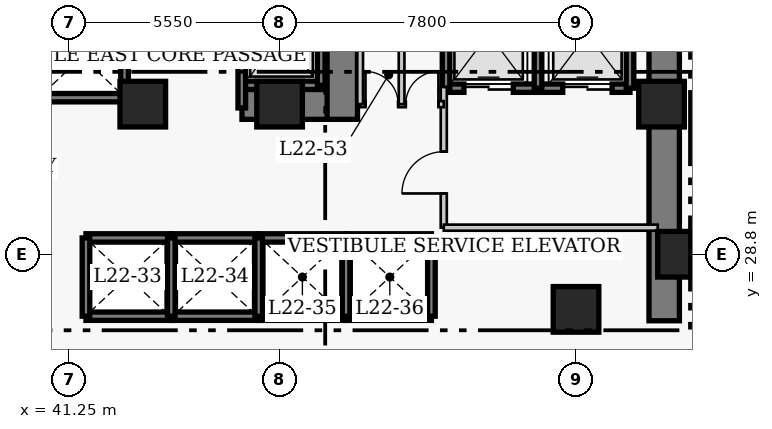
"""IFC4 building model, lengths in metres.
Left out: names, types, materials, properties, quantities, classifications, styles, units other than length and angle.
Written with IfcOpenShell. Run it as: python <this file> out.ifc"""

import sys

from ifc_helpers import new_model, si_unit, direction, frame, frame_2d, origin, origin_2d, place, context, subcontext, project, spatial, rectangle, extrude, element, fill, save


model = new_model("IFC4")
c1 = context("Model", 3, precision=1e-05, world=origin(), true_north=direction((0.0, 1.0)))
c2 = subcontext(c1, "Body", "Model", "MODEL_VIEW")
j1 = project(units=[si_unit("LENGTHUNIT", "METRE"), si_unit("PLANEANGLEUNIT", "RADIAN")], contexts=[c1])
p1 = place(None, origin())
s1 = spatial("IfcSite", under=j1, at=p1, CompositionType="ELEMENT")
p2 = place(p1, origin())
s2 = spatial("IfcBuilding", under=s1, at=p2, CompositionType="ELEMENT")
p3 = place(p2, frame((0.0, 0.0, 91.8)))
s3 = spatial("IfcBuildingStorey", under=s2, at=p3, CompositionType="ELEMENT", Elevation=91.8)
p4 = place(p3, frame((56.92, 27.05, 0.0), z_axis=(0.0, 0.0, 1.0), x_axis=(0.0, 1.0, 0.0)))
e1 = element("IfcWall", 1, at=p4, inside=s3, PredefinedType="SHEAR", context=c2, shape_type="SweptSolid", body=[
    extrude(rectangle(XDim=13.67, YDim=0.8, at=frame_2d((6.835, 0.0))), origin(), (0.0, 0.0, 1.0), 3.8),
])
p5 = place(p3, frame((45.81, 32.75, 0.0), z_axis=(0.0, 0.0, 1.0), x_axis=(1.0, 0.0, 0.0)))
e2 = element("IfcWall", 2, at=p5, inside=s3, PredefinedType="SHEAR", context=c2, shape_type="SweptSolid", body=[
    extrude(rectangle(XDim=2.64, YDim=0.8, at=frame_2d((1.32, 0.0))), origin(), (0.0, 0.0, 1.0), 3.8),
])
p6 = place(p3, frame((48.45, 32.35, 0.0), z_axis=(0.0, 0.0, 1.0), x_axis=(0.0, 1.0, 0.0)))
e3 = element("IfcWall", 3, at=p6, inside=s3, PredefinedType="SHEAR", context=c2, shape_type="SweptSolid", body=[
    extrude(rectangle(XDim=7.97, YDim=0.8, at=frame_2d((3.985, 0.0))), origin(), (0.0, 0.0, 1.0), 3.8),
])
p7 = place(p6, frame((5.85, 0.0, 0.0)))
e4 = element("IfcOpeningElement", 4, at=p7, cuts=e3, PredefinedType="OPENING", context=c2, shape_type="SweptSolid", body=[
    extrude(rectangle(XDim=1.1, YDim=2.15, at=frame_2d((0.55, 1.075))), frame((0.0, 0.41, 0.0), z_axis=(0.0, -1.0, 0.0), x_axis=(1.0, 0.0, 0.0)), (0.0, 0.0, 1.0), 0.82),
])
for number, where, z_axis, x_axis in (
    (5, (57.35, 28.8, 0.0), (0.0, 0.0, 1.0), (1.0, 0.0, 0.0)),
    (6, (43.2, 32.75, 0.0), (0.0, 0.0, 1.0), (1.0, 0.0, 0.0)),
    (7, (46.8, 32.75, 0.0), (0.0, 0.0, 1.0), (1.0, 0.0, 0.0)),
    (8, (54.6, 27.35, 0.0), (0.0, 0.0, 1.0), (1.0, 0.0, 0.0)),
    (9, (56.85, 32.75, 0.0), (0.0, 0.0, 1.0), (1.0, 0.0, 0.0)),
):
    element("IfcColumn", number, at=place(p3, frame(where, z_axis=z_axis, x_axis=x_axis)), inside=s3, PredefinedType="COLUMN", context=c2, shape_type="SweptSolid", body=[
        extrude(rectangle(XDim=1.2, YDim=1.2, at=origin_2d()), origin(), (0.0, 0.0, 1.0), 3.8),
    ])
for number, where, z_axis, x_axis in (
    (10, (41.705, 29.23, 0.0), (0.0, 0.0, 1.0), (1.0, 0.0, 0.0)),
    (11, (41.705, 27.17, 0.0), (0.0, 0.0, 1.0), (1.0, 0.0, 0.0)),
):
    element("IfcWall", number, at=place(p3, frame(where, z_axis=z_axis, x_axis=x_axis)), inside=s3, PredefinedType="SHEAR", context=c2, shape_type="SweptSolid", body=[
        extrude(rectangle(XDim=2.245, YDim=0.22, at=frame_2d((1.123, 0.0))), origin(), (0.0, 0.0, 1.0), 3.8),
    ])
p8 = place(p3, frame((41.705, 27.17, 0.0), z_axis=(0.0, 0.0, 1.0), x_axis=(0.0, 1.0, 0.0)))
e12 = element("IfcWall", 12, at=p8, inside=s3, PredefinedType="SHEAR", context=c2, shape_type="SweptSolid", body=[
    extrude(rectangle(XDim=2.06, YDim=0.2, at=frame_2d((1.03, 0.0))), origin(), (0.0, 0.0, 1.0), 3.8),
])
for number, where, z_axis, x_axis in (
    (13, (43.95, 29.23, 0.0), (0.0, 0.0, 1.0), (1.0, 0.0, 0.0)),
    (14, (43.95, 27.17, 0.0), (0.0, 0.0, 1.0), (1.0, 0.0, 0.0)),
):
    element("IfcWall", number, at=place(p3, frame(where, z_axis=z_axis, x_axis=x_axis)), inside=s3, PredefinedType="SHEAR", context=c2, shape_type="SweptSolid", body=[
        extrude(rectangle(XDim=2.3, YDim=0.22, at=frame_2d((1.15, 0.0))), origin(), (0.0, 0.0, 1.0), 3.8),
    ])
p9 = place(p3, frame((43.95, 27.17, 0.0), z_axis=(0.0, 0.0, 1.0), x_axis=(0.0, 1.0, 0.0)))
e15 = element("IfcWall", 15, at=p9, inside=s3, PredefinedType="SHEAR", context=c2, shape_type="SweptSolid", body=[
    extrude(rectangle(XDim=2.06, YDim=0.2, at=frame_2d((1.03, 0.0))), origin(), (0.0, 0.0, 1.0), 3.8),
])
for number, where, z_axis, x_axis in (
    (16, (46.25, 29.23, 0.0), (0.0, 0.0, 1.0), (1.0, 0.0, 0.0)),
    (17, (46.25, 27.17, 0.0), (0.0, 0.0, 1.0), (1.0, 0.0, 0.0)),
):
    element("IfcWall", number, at=place(p3, frame(where, z_axis=z_axis, x_axis=x_axis)), inside=s3, PredefinedType="SHEAR", context=c2, shape_type="SweptSolid", body=[
        extrude(rectangle(XDim=2.3, YDim=0.22, at=frame_2d((1.15, 0.0))), origin(), (0.0, 0.0, 1.0), 3.8),
    ])
p10 = place(p3, frame((46.25, 27.17, 0.0), z_axis=(0.0, 0.0, 1.0), x_axis=(0.0, 1.0, 0.0)))
e18 = element("IfcWall", 18, at=p10, inside=s3, PredefinedType="SHEAR", context=c2, shape_type="SweptSolid", body=[
    extrude(rectangle(XDim=2.06, YDim=0.2, at=frame_2d((1.03, 0.0))), origin(), (0.0, 0.0, 1.0), 3.8),
])
for number, where, z_axis, x_axis in (
    (19, (48.55, 29.23, 0.0), (0.0, 0.0, 1.0), (1.0, 0.0, 0.0)),
    (20, (48.55, 27.17, 0.0), (0.0, 0.0, 1.0), (1.0, 0.0, 0.0)),
):
    element("IfcWall", number, at=place(p3, frame(where, z_axis=z_axis, x_axis=x_axis)), inside=s3, PredefinedType="SHEAR", context=c2, shape_type="SweptSolid", body=[
        extrude(rectangle(XDim=2.245, YDim=0.22, at=frame_2d((1.123, 0.0))), origin(), (0.0, 0.0, 1.0), 3.8),
    ])
for number, where, z_axis, x_axis in (
    (21, (48.55, 27.17, 0.0), (0.0, 0.0, 1.0), (0.0, 1.0, 0.0)),
    (22, (50.795, 27.17, 0.0), (0.0, 0.0, 1.0), (0.0, 1.0, 0.0)),
):
    element("IfcWall", number, at=place(p3, frame(where, z_axis=z_axis, x_axis=x_axis)), inside=s3, PredefinedType="SHEAR", context=c2, shape_type="SweptSolid", body=[
        extrude(rectangle(XDim=2.06, YDim=0.2, at=frame_2d((1.03, 0.0))), origin(), (0.0, 0.0, 1.0), 3.8),
    ])
p11 = place(p3, frame((40.4, 32.92, 0.0), z_axis=(0.0, 0.0, 1.0), x_axis=(1.0, 0.0, 0.0)))
e23 = element("IfcWall", 23, at=p11, inside=s3, PredefinedType="SHEAR", context=c2, shape_type="SweptSolid", body=[
    extrude(rectangle(XDim=2.32, YDim=0.22, at=frame_2d((1.16, 0.0))), origin(), (0.0, 0.0, 1.0), 3.8),
])
p12 = place(p3, frame((42.72, 32.92, 0.0), z_axis=(0.0, 0.0, 1.0), x_axis=(0.0, 1.0, 0.0)))
e24 = element("IfcWall", 24, at=p12, inside=s3, PredefinedType="SHEAR", context=c2, shape_type="SweptSolid", body=[
    extrude(rectangle(XDim=2.16, YDim=0.2, at=frame_2d((1.08, 0.0))), origin(), (0.0, 0.0, 1.0), 3.8),
])
p13 = place(p3, frame((51.18, 33.17, 0.0), z_axis=(0.0, 0.0, 1.0), x_axis=(1.0, 0.0, 0.0)))
e25 = element("IfcWall", 25, at=p13, inside=s3, PredefinedType="SHEAR", context=c2, shape_type="SweptSolid", body=[
    extrude(rectangle(XDim=2.42, YDim=0.22, at=frame_2d((1.21, 0.0))), origin(), (0.0, 0.0, 1.0), 3.8),
])
p14 = place(p13, frame((0.47, 0.0, 0.0)))
e26 = element("IfcOpeningElement", 26, at=p14, cuts=e25, PredefinedType="OPENING", context=c2, shape_type="SweptSolid", body=[
    extrude(rectangle(XDim=1.3, YDim=2.15, at=frame_2d((0.65, 1.075))), frame((0.0, 0.12, 0.0), z_axis=(0.0, -1.0, 0.0), x_axis=(1.0, 0.0, 0.0)), (0.0, 0.0, 1.0), 0.24),
])
p15 = place(p3, frame((51.18, 33.17, 0.0), z_axis=(0.0, 0.0, 1.0), x_axis=(0.0, 1.0, 0.0)))
e27 = element("IfcWall", 27, at=p15, inside=s3, PredefinedType="SHEAR", context=c2, shape_type="SweptSolid", body=[
    extrude(rectangle(XDim=2.86, YDim=0.2, at=frame_2d((1.43, 0.0))), origin(), (0.0, 0.0, 1.0), 3.8),
])
p16 = place(p3, frame((53.6, 33.17, 0.0), z_axis=(0.0, 0.0, 1.0), x_axis=(1.0, 0.0, 0.0)))
e28 = element("IfcWall", 28, at=p16, inside=s3, PredefinedType="SHEAR", context=c2, shape_type="SweptSolid", body=[
    extrude(rectangle(XDim=2.42, YDim=0.22, at=frame_2d((1.21, 0.0))), origin(), (0.0, 0.0, 1.0), 3.8),
])
p17 = place(p16, frame((0.65, 0.0, 0.0)))
e29 = element("IfcOpeningElement", 29, at=p17, cuts=e28, PredefinedType="OPENING", context=c2, shape_type="SweptSolid", body=[
    extrude(rectangle(XDim=1.3, YDim=2.15, at=frame_2d((0.65, 1.075))), frame((0.0, 0.12, 0.0), z_axis=(0.0, -1.0, 0.0), x_axis=(1.0, 0.0, 0.0)), (0.0, 0.0, 1.0), 0.24),
])
for number, where, z_axis, x_axis in (
    (30, (53.6, 33.17, 0.0), (0.0, 0.0, 1.0), (0.0, 1.0, 0.0)),
    (31, (56.02, 33.17, 0.0), (0.0, 0.0, 1.0), (0.0, 1.0, 0.0)),
):
    element("IfcWall", number, at=place(p3, frame(where, z_axis=z_axis, x_axis=x_axis)), inside=s3, PredefinedType="SHEAR", context=c2, shape_type="SweptSolid", body=[
        extrude(rectangle(XDim=2.86, YDim=0.2, at=frame_2d((1.43, 0.0))), origin(), (0.0, 0.0, 1.0), 3.8),
    ])
p18 = place(p3, frame((45.805, 33.245, 0.0), z_axis=(0.0, 0.0, 1.0), x_axis=(1.0, 0.0, 0.0)))
e32 = element("IfcWall", 32, at=p18, inside=s3, PredefinedType="SHEAR", context=c2, shape_type="SweptSolid", body=[
    extrude(rectangle(XDim=2.09, YDim=0.22, at=frame_2d((1.045, 0.0))), origin(), (0.0, 0.0, 1.0), 3.8),
])
p19 = place(p3, frame((45.805, 32.65, 0.0), z_axis=(0.0, 0.0, 1.0), x_axis=(0.0, 1.0, 0.0)))
e33 = element("IfcWall", 33, at=p19, inside=s3, PredefinedType="SHEAR", context=c2, shape_type="SweptSolid", body=[
    extrude(rectangle(XDim=3.505, YDim=0.2, at=frame_2d((1.752, 0.0))), origin(), (0.0, 0.0, 1.0), 3.8),
])
p20 = place(p3, frame((47.895, 33.245, 0.0), z_axis=(0.0, 0.0, 1.0), x_axis=(0.0, 1.0, 0.0)))
e34 = element("IfcWall", 34, at=p20, inside=s3, PredefinedType="SHEAR", context=c2, shape_type="SweptSolid", body=[
    extrude(rectangle(XDim=2.91, YDim=0.2, at=frame_2d((1.455, 0.0))), origin(), (0.0, 0.0, 1.0), 3.8),
])
p21 = place(p3, frame((51.12, 29.5, 0.0), z_axis=(0.0, 0.0, 1.0), x_axis=(0.0, 1.0, 0.0)))
e35 = element("IfcWall", 35, at=p21, inside=s3, PredefinedType="PARTITIONING", context=c2, shape_type="SweptSolid", body=[
    extrude(rectangle(XDim=3.7, YDim=0.16, at=frame_2d((1.85, 0.0))), origin(), (0.0, 0.0, 1.0), 3.54),
])
p22 = place(p21, frame((0.9, 0.0, 0.0)))
e36 = element("IfcOpeningElement", 36, at=p22, cuts=e35, PredefinedType="OPENING", context=c2, shape_type="SweptSolid", body=[
    extrude(rectangle(XDim=1.1, YDim=2.15, at=frame_2d((0.55, 1.075))), frame((0.0, 0.09, 0.0), z_axis=(0.0, -1.0, 0.0), x_axis=(1.0, 0.0, 0.0)), (0.0, 0.0, 1.0), 0.18),
])
p23 = place(p3, frame((51.12, 29.5, 0.0), z_axis=(0.0, 0.0, 1.0), x_axis=(1.0, 0.0, 0.0)))
e37 = element("IfcWall", 37, at=p23, inside=s3, PredefinedType="PARTITIONING", context=c2, shape_type="SweptSolid", body=[
    extrude(rectangle(XDim=5.63, YDim=0.16, at=frame_2d((2.815, 0.0))), origin(), (0.0, 0.0, 1.0), 3.54),
])
p24 = place(p3, frame((48.92, 32.75, 0.0), z_axis=(0.0, 0.0, 1.0), x_axis=(1.0, 0.0, 0.0)))
e38 = element("IfcWall", 38, at=p24, inside=s3, PredefinedType="PARTITIONING", context=c2, shape_type="SweptSolid", body=[
    extrude(rectangle(XDim=2.2, YDim=0.16, at=frame_2d((1.1, 0.0))), origin(), (0.0, 0.0, 1.0), 3.54),
])
p25 = place(p24, frame((0.14, 0.0, 0.0)))
e39 = element("IfcOpeningElement", 39, at=p25, cuts=e38, PredefinedType="OPENING", context=c2, shape_type="SweptSolid", body=[
    extrude(rectangle(XDim=0.86, YDim=2.05, at=frame_2d((0.43, 1.025))), frame((0.0, 0.09, 0.0), z_axis=(0.0, -1.0, 0.0), x_axis=(1.0, 0.0, 0.0)), (0.0, 0.0, 1.0), 0.18),
])
p26 = place(p24, frame((1.2, 0.0, 0.0)))
e40 = element("IfcOpeningElement", 40, at=p26, cuts=e38, PredefinedType="OPENING", context=c2, shape_type="SweptSolid", body=[
    extrude(rectangle(XDim=0.86, YDim=2.05, at=frame_2d((0.43, 1.025))), frame((0.0, 0.09, 0.0), z_axis=(0.0, -1.0, 0.0), x_axis=(1.0, 0.0, 0.0)), (0.0, 0.0, 1.0), 0.18),
])
for number, where, z_axis, x_axis in (
    (41, (48.92, 32.75, 0.0), (0.0, 0.0, 1.0), (0.0, 1.0, 0.0)),
    (42, (50.01, 32.75, 0.0), (0.0, 0.0, 1.0), (0.0, 1.0, 0.0)),
):
    element("IfcWall", number, at=place(p3, frame(where, z_axis=z_axis, x_axis=x_axis)), inside=s3, PredefinedType="PARTITIONING", context=c2, shape_type="SweptSolid", body=[
        extrude(rectangle(XDim=3.62, YDim=0.15, at=frame_2d((1.81, 0.0))), origin(), (0.0, 0.0, 1.0), 3.54),
    ])
p27 = place(p14, origin())
e43 = element("IfcDoor", 43, at=p27, inside=s3, OperationType="DOUBLE_DOOR_SLIDING", PredefinedType="DOOR", context=c2, shape_type="SweptSolid", body=[
    extrude(rectangle(XDim=1.3, YDim=2.15, at=frame_2d((0.65, 1.075))), frame((0.0, 0.025, 0.0), z_axis=(0.0, -1.0, 0.0), x_axis=(1.0, 0.0, 0.0)), (0.0, 0.0, 1.0), 0.05),
])
fill(e26, e43)
p28 = place(p17, origin())
e44 = element("IfcDoor", 44, at=p28, inside=s3, OperationType="DOUBLE_DOOR_SLIDING", PredefinedType="DOOR", context=c2, shape_type="SweptSolid", body=[
    extrude(rectangle(XDim=1.3, YDim=2.15, at=frame_2d((0.65, 1.075))), frame((0.0, 0.025, 0.0), z_axis=(0.0, -1.0, 0.0), x_axis=(1.0, 0.0, 0.0)), (0.0, 0.0, 1.0), 0.05),
])
fill(e29, e44)
p29 = place(p22, origin())
e45 = element("IfcDoor", 45, at=p29, inside=s3, OperationType="SINGLE_SWING_LEFT", PredefinedType="DOOR", context=c2, shape_type="SweptSolid", body=[
    extrude(rectangle(XDim=1.1, YDim=2.15, at=frame_2d((0.55, 1.075))), frame((0.0, 0.025, 0.0), z_axis=(0.0, -1.0, 0.0), x_axis=(1.0, 0.0, 0.0)), (0.0, 0.0, 1.0), 0.05),
])
fill(e36, e45)
p30 = place(p25, origin())
e46 = element("IfcDoor", 46, at=p30, inside=s3, OperationType="SINGLE_SWING_LEFT", PredefinedType="DOOR", context=c2, shape_type="SweptSolid", body=[
    extrude(rectangle(XDim=0.86, YDim=2.05, at=frame_2d((0.43, 1.025))), frame((0.0, 0.025, 0.0), z_axis=(0.0, -1.0, 0.0), x_axis=(1.0, 0.0, 0.0)), (0.0, 0.0, 1.0), 0.05),
])
fill(e39, e46)
p31 = place(p26, origin())
e47 = element("IfcDoor", 47, at=p31, inside=s3, OperationType="SINGLE_SWING_RIGHT", PredefinedType="DOOR", context=c2, shape_type="SweptSolid", body=[
    extrude(rectangle(XDim=0.86, YDim=2.05, at=frame_2d((0.43, 1.025))), frame((0.0, 0.025, 0.0), z_axis=(0.0, -1.0, 0.0), x_axis=(1.0, 0.0, 0.0)), (0.0, 0.0, 1.0), 0.05),
])
fill(e40, e47)
save(model, sys.argv[1])
